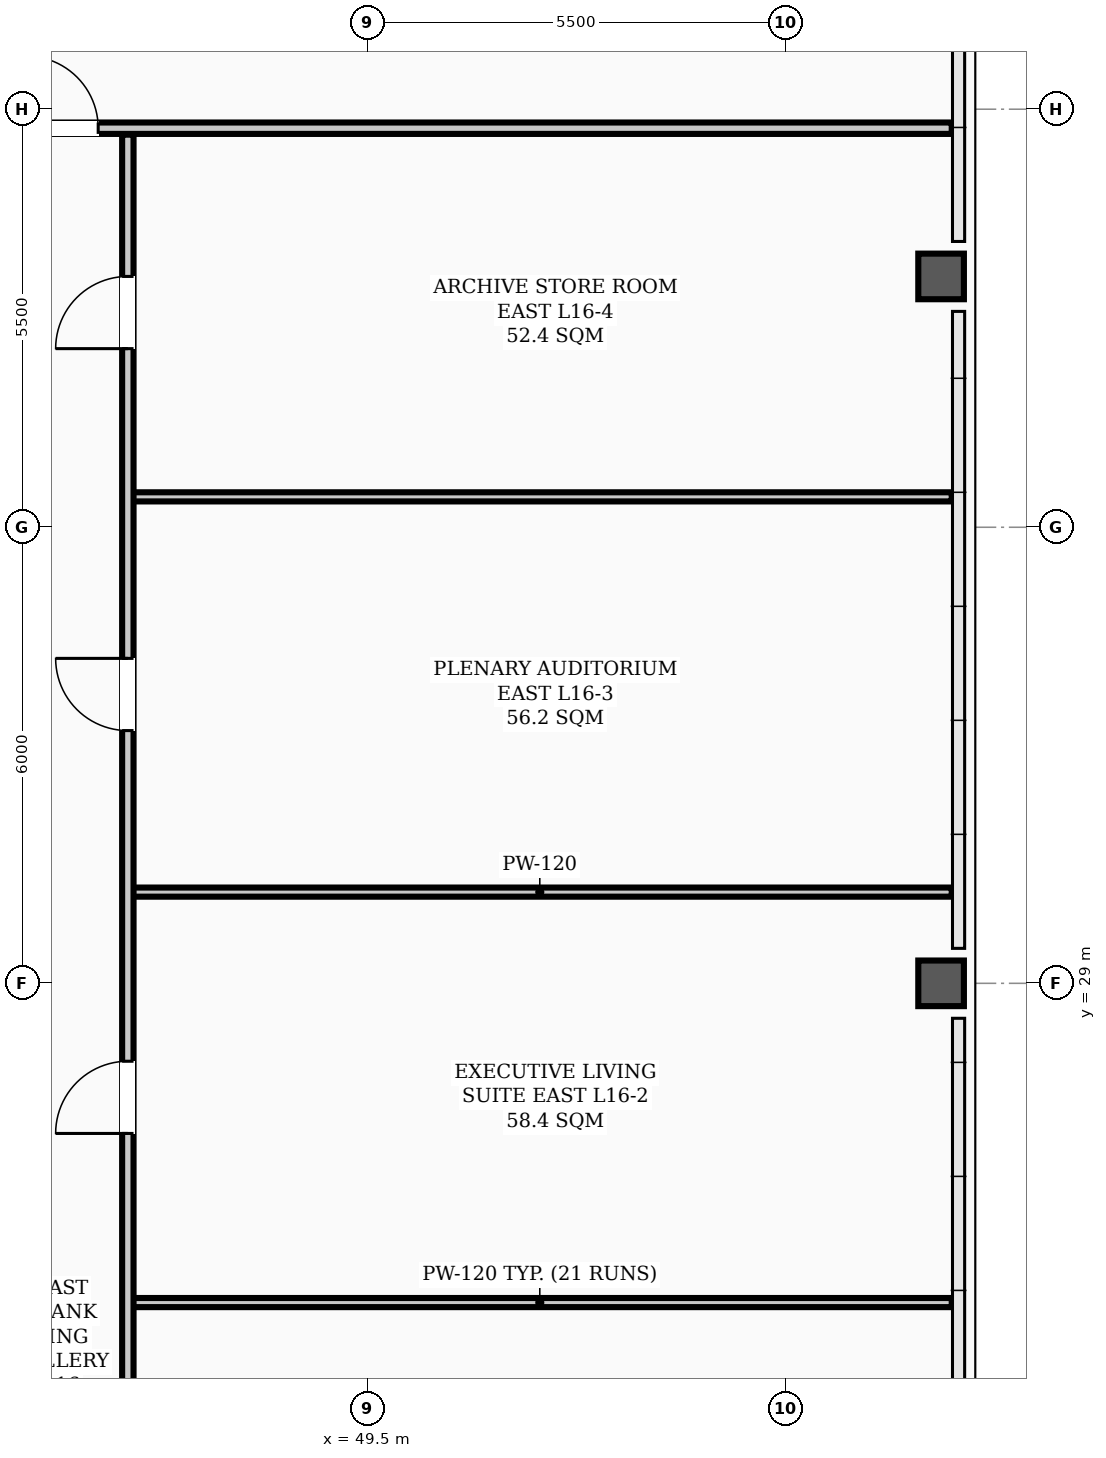
"""IFC4 building model, lengths in metres.
Left out: names, types, materials, properties, quantities, classifications, styles, units other than length and angle.
Written with IfcOpenShell. Run it as: python <this file> out.ifc"""

import sys

from ifc_helpers import new_model, si_unit, direction, frame, frame_2d, origin, origin_2d, place, context, subcontext, project, spatial, rectangle, hollow_rectangle, extrude, element, fill, save


model = new_model("IFC4")
c1 = context("Model", 3, precision=1e-05, world=origin(), true_north=direction((0.0, 1.0)))
c2 = subcontext(c1, "Body", "Model", "MODEL_VIEW")
j1 = project(units=[si_unit("LENGTHUNIT", "METRE"), si_unit("PLANEANGLEUNIT", "RADIAN")], contexts=[c1])
p1 = place(None, origin())
s1 = spatial("IfcSite", under=j1, at=p1, CompositionType="ELEMENT")
p2 = place(p1, origin())
s2 = spatial("IfcBuilding", under=s1, at=p2, CompositionType="ELEMENT")
p3 = place(p2, frame((0.0, 0.0, 65.5)))
s3 = spatial("IfcBuildingStorey", under=s2, at=p3, CompositionType="ELEMENT", Elevation=65.5)
for number, where, z_axis, x_axis in (
    (1, (57.05, 29.0, 0.0), (0.0, 0.0, 1.0), (1.0, 0.0, 0.0)),
    (2, (57.05, 38.3, 0.0), (0.0, 0.0, 1.0), (1.0, 0.0, 0.0)),
):
    element("IfcColumn", number, at=place(p3, frame(where, z_axis=z_axis, x_axis=x_axis)), inside=s3, PredefinedType="COLUMN", context=c2, shape_type="SweptSolid", body=[
        extrude(hollow_rectangle(XDim=0.6, YDim=0.6, WallThickness=0.026, InnerFilletRadius=0.013, OuterFilletRadius=0.039, at=origin_2d()), origin(), (0.0, 0.0, 1.0), 3.9),
    ])
for number, where, z_axis, x_axis in (
    (3, (46.35, 24.8, 0.0), (0.0, 0.0, 1.0), (1.0, 0.0, 0.0)),
    (4, (46.35, 30.2, 0.0), (0.0, 0.0, 1.0), (1.0, 0.0, 0.0)),
    (5, (46.35, 35.4, 0.0), (0.0, 0.0, 1.0), (1.0, 0.0, 0.0)),
):
    element("IfcWall", number, at=place(p3, frame(where, z_axis=z_axis, x_axis=x_axis)), inside=s3, PredefinedType="PARTITIONING", context=c2, shape_type="SweptSolid", body=[
        extrude(rectangle(XDim=10.84, YDim=0.12, at=frame_2d((5.42, 0.0))), origin(), (0.0, 0.0, 1.0), 3.212),
    ])
p4 = place(p3, frame((7.81, 40.25, 0.0), z_axis=(0.0, 0.0, 1.0), x_axis=(1.0, 0.0, 0.0)))
e6 = element("IfcWall", 6, at=p4, inside=s3, PredefinedType="PARTITIONING", context=c2, shape_type="SweptSolid", body=[
    extrude(rectangle(XDim=49.38, YDim=0.15, at=frame_2d((24.69, 0.0))), origin(), (0.0, 0.0, 1.0), 3.1),
])
p5 = place(p4, frame((3.73, 0.0, 0.0)))
e7 = element("IfcOpeningElement", 7, at=p5, cuts=e6, PredefinedType="OPENING", context=c2, shape_type="SweptSolid", body=[
    extrude(rectangle(XDim=0.95, YDim=2.08, at=frame_2d((0.475, 1.04))), frame((0.0, 0.085, 0.0), z_axis=(0.0, -1.0, 0.0), x_axis=(1.0, 0.0, 0.0)), (0.0, 0.0, 1.0), 0.17),
])
p6 = place(p4, frame((11.015, 0.0, 0.0)))
e8 = element("IfcOpeningElement", 8, at=p6, cuts=e6, PredefinedType="OPENING", context=c2, shape_type="SweptSolid", body=[
    extrude(rectangle(XDim=0.95, YDim=2.08, at=frame_2d((0.475, 1.04))), frame((0.0, 0.085, 0.0), z_axis=(0.0, -1.0, 0.0), x_axis=(1.0, 0.0, 0.0)), (0.0, 0.0, 1.0), 0.17),
])
p7 = place(p4, frame((18.215, 0.0, 0.0)))
e9 = element("IfcOpeningElement", 9, at=p7, cuts=e6, PredefinedType="OPENING", context=c2, shape_type="SweptSolid", body=[
    extrude(rectangle(XDim=0.95, YDim=2.08, at=frame_2d((0.475, 1.04))), frame((0.0, 0.085, 0.0), z_axis=(0.0, -1.0, 0.0), x_axis=(1.0, 0.0, 0.0)), (0.0, 0.0, 1.0), 0.17),
])
p8 = place(p4, frame((25.515, 0.0, 0.0)))
e10 = element("IfcOpeningElement", 10, at=p8, cuts=e6, PredefinedType="OPENING", context=c2, shape_type="SweptSolid", body=[
    extrude(rectangle(XDim=0.95, YDim=2.08, at=frame_2d((0.475, 1.04))), frame((0.0, 0.085, 0.0), z_axis=(0.0, -1.0, 0.0), x_axis=(1.0, 0.0, 0.0)), (0.0, 0.0, 1.0), 0.17),
])
p9 = place(p4, frame((31.915, 0.0, 0.0)))
e11 = element("IfcOpeningElement", 11, at=p9, cuts=e6, PredefinedType="OPENING", context=c2, shape_type="SweptSolid", body=[
    extrude(rectangle(XDim=0.95, YDim=2.08, at=frame_2d((0.475, 1.04))), frame((0.0, 0.085, 0.0), z_axis=(0.0, -1.0, 0.0), x_axis=(1.0, 0.0, 0.0)), (0.0, 0.0, 1.0), 0.17),
])
p10 = place(p4, frame((37.2, 0.0, 0.0)))
e12 = element("IfcOpeningElement", 12, at=p10, cuts=e6, PredefinedType="OPENING", context=c2, shape_type="SweptSolid", body=[
    extrude(rectangle(XDim=0.95, YDim=2.08, at=frame_2d((0.475, 1.04))), frame((0.0, 0.085, 0.0), z_axis=(0.0, -1.0, 0.0), x_axis=(1.0, 0.0, 0.0)), (0.0, 0.0, 1.0), 0.17),
])
p11 = place(p3, frame((46.35, 17.635, 0.0), z_axis=(0.0, 0.0, 1.0), x_axis=(0.0, 1.0, 0.0)))
e13 = element("IfcWall", 13, at=p11, inside=s3, PredefinedType="PARTITIONING", context=c2, shape_type="SweptSolid", body=[
    extrude(rectangle(XDim=22.53, YDim=0.15, at=frame_2d((11.265, 0.0))), origin(), (0.0, 0.0, 1.0), 3.0),
])
p12 = place(p11, frame((3.065, 0.0, 0.0)))
e14 = element("IfcOpeningElement", 14, at=p12, cuts=e13, PredefinedType="OPENING", context=c2, shape_type="SweptSolid", body=[
    extrude(rectangle(XDim=0.95, YDim=2.08, at=frame_2d((0.475, 1.04))), frame((0.0, 0.085, 0.0), z_axis=(0.0, -1.0, 0.0), x_axis=(1.0, 0.0, 0.0)), (0.0, 0.0, 1.0), 0.17),
])
p13 = place(p11, frame((9.39, 0.0, 0.0)))
e15 = element("IfcOpeningElement", 15, at=p13, cuts=e13, PredefinedType="OPENING", context=c2, shape_type="SweptSolid", body=[
    extrude(rectangle(XDim=0.95, YDim=2.08, at=frame_2d((0.475, 1.04))), frame((0.0, 0.085, 0.0), z_axis=(0.0, -1.0, 0.0), x_axis=(1.0, 0.0, 0.0)), (0.0, 0.0, 1.0), 0.17),
])
p14 = place(p11, frame((14.69, 0.0, 0.0)))
e16 = element("IfcOpeningElement", 16, at=p14, cuts=e13, PredefinedType="OPENING", context=c2, shape_type="SweptSolid", body=[
    extrude(rectangle(XDim=0.95, YDim=2.08, at=frame_2d((0.475, 1.04))), frame((0.0, 0.085, 0.0), z_axis=(0.0, -1.0, 0.0), x_axis=(1.0, 0.0, 0.0)), (0.0, 0.0, 1.0), 0.17),
])
p15 = place(p11, frame((19.715, 0.0, 0.0)))
e17 = element("IfcOpeningElement", 17, at=p15, cuts=e13, PredefinedType="OPENING", context=c2, shape_type="SweptSolid", body=[
    extrude(rectangle(XDim=0.95, YDim=2.08, at=frame_2d((0.475, 1.04))), frame((0.0, 0.085, 0.0), z_axis=(0.0, -1.0, 0.0), x_axis=(1.0, 0.0, 0.0)), (0.0, 0.0, 1.0), 0.17),
])
p16 = place(p13, origin())
e18 = element("IfcDoor", 18, at=p16, inside=s3, OperationType="SINGLE_SWING_LEFT", PredefinedType="DOOR", context=c2, shape_type="SweptSolid", body=[
    extrude(rectangle(XDim=0.95, YDim=2.08, at=frame_2d((0.475, 1.04))), frame((0.0, 0.025, 0.0), z_axis=(0.0, -1.0, 0.0), x_axis=(1.0, 0.0, 0.0)), (0.0, 0.0, 1.0), 0.05),
])
fill(e15, e18)
p17 = place(p14, origin())
e19 = element("IfcDoor", 19, at=p17, inside=s3, OperationType="SINGLE_SWING_RIGHT", PredefinedType="DOOR", context=c2, shape_type="SweptSolid", body=[
    extrude(rectangle(XDim=0.95, YDim=2.08, at=frame_2d((0.475, 1.04))), frame((0.0, 0.025, 0.0), z_axis=(0.0, -1.0, 0.0), x_axis=(1.0, 0.0, 0.0)), (0.0, 0.0, 1.0), 0.05),
])
fill(e16, e19)
p18 = place(p15, origin())
e20 = element("IfcDoor", 20, at=p18, inside=s3, OperationType="SINGLE_SWING_LEFT", PredefinedType="DOOR", context=c2, shape_type="SweptSolid", body=[
    extrude(rectangle(XDim=0.95, YDim=2.08, at=frame_2d((0.475, 1.04))), frame((0.0, 0.025, 0.0), z_axis=(0.0, -1.0, 0.0), x_axis=(1.0, 0.0, 0.0)), (0.0, 0.0, 1.0), 0.05),
])
fill(e17, e20)
p19 = place(p10, origin())
e21 = element("IfcDoor", 21, at=p19, inside=s3, OperationType="SINGLE_SWING_LEFT", PredefinedType="DOOR", context=c2, shape_type="SweptSolid", body=[
    extrude(rectangle(XDim=0.95, YDim=2.08, at=frame_2d((0.475, 1.04))), frame((0.0, 0.025, 0.0), z_axis=(0.0, -1.0, 0.0), x_axis=(1.0, 0.0, 0.0)), (0.0, 0.0, 1.0), 0.05),
])
fill(e12, e21)
save(model, sys.argv[1])
